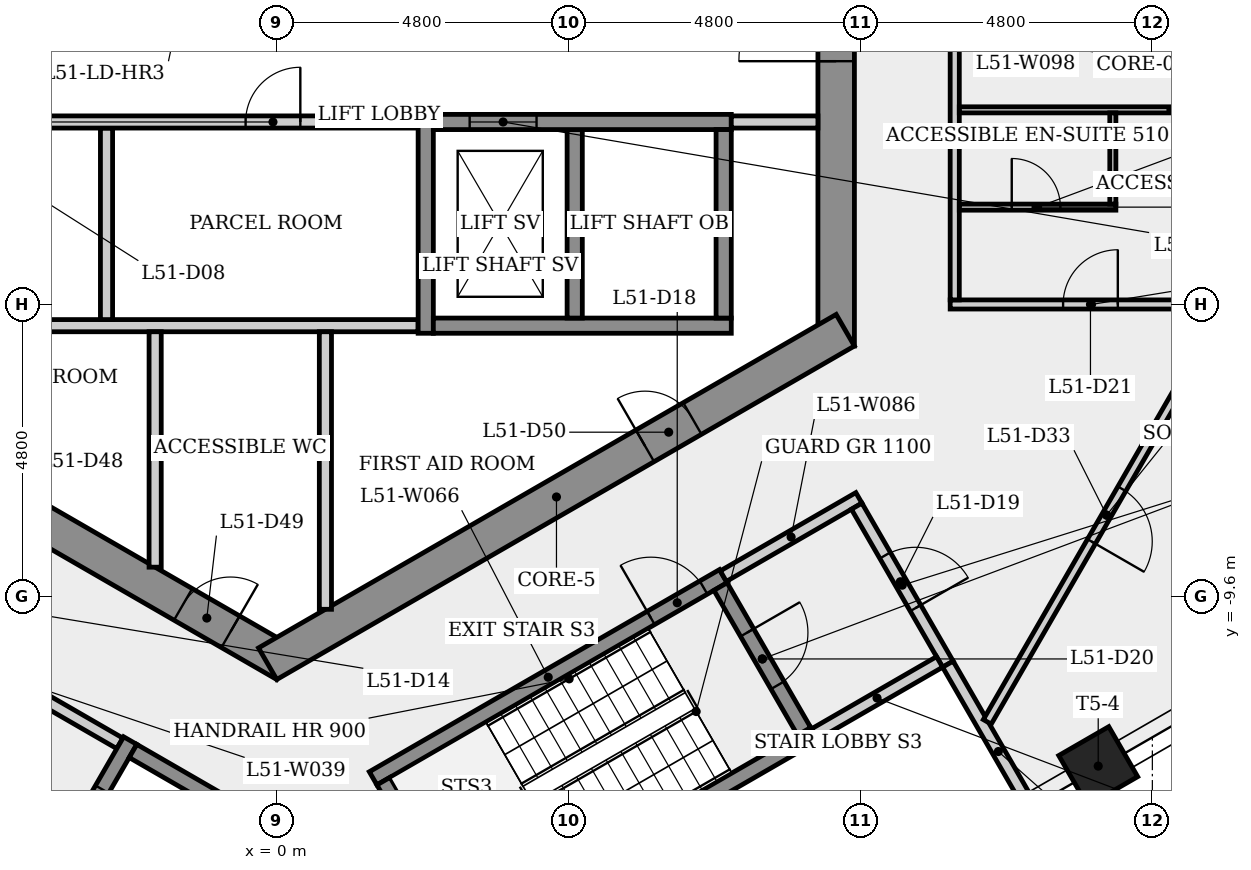
"""IFC4 building model, lengths in metres.
Left out: names, types, materials, properties, quantities, classifications, styles, units other than length and angle.
Written with IfcOpenShell. Run it as: python <this file> out.ifc"""

import sys

from ifc_helpers import new_model, si_unit, direction, frame, frame_2d, origin, origin_2d, place, context, subcontext, project, spatial, rectangle, extrude, element, fill, save


model = new_model("IFC4")
c1 = context("Model", 3, precision=1e-05, world=origin(), true_north=direction((0.0, 1.0)))
c2 = subcontext(c1, "Body", "Model", "MODEL_VIEW")
j1 = project(units=[si_unit("LENGTHUNIT", "METRE"), si_unit("PLANEANGLEUNIT", "RADIAN")], contexts=[c1])
p1 = place(None, origin())
s1 = spatial("IfcSite", under=j1, at=p1, CompositionType="ELEMENT")
p2 = place(p1, origin())
s2 = spatial("IfcBuilding", under=s1, at=p2, CompositionType="ELEMENT")
p3 = place(p2, frame((0.0, 0.0, 190.7)))
s3 = spatial("IfcBuildingStorey", under=s2, at=p3, CompositionType="ELEMENT", Elevation=190.7)
p4 = place(p3, frame((9.2, -5.485, 0.0), z_axis=(0.0, 0.0, 1.0), x_axis=(0.0, 1.0, 0.0)))
e1 = element("IfcWall", 1, at=p4, inside=s3, PredefinedType="SHEAR", context=c2, shape_type="SweptSolid", body=[
    extrude(rectangle(XDim=10.97, YDim=0.6, at=frame_2d((5.485, 0.0))), origin(), (0.0, 0.0, 1.0), 4.0),
])
p5 = place(p4, frame((4.685, 0.0, 0.0)))
e2 = element("IfcOpeningElement", 2, at=p5, cuts=e1, PredefinedType="OPENING", context=c2, shape_type="SweptSolid", body=[
    extrude(rectangle(XDim=1.6, YDim=2.1, at=frame_2d((0.8, 1.05))), frame((0.0, 0.31, 0.0), z_axis=(0.0, -1.0, 0.0), x_axis=(1.0, 0.0, 0.0)), (0.0, 0.0, 1.0), 0.62),
])
p6 = place(p3, frame((-9.35, -5.225, 0.0), z_axis=(0.0, 0.0, 1.0), x_axis=(0.866023993627, -0.500002442456, 0.0)))
e3 = element("IfcWall", 3, at=p6, inside=s3, PredefinedType="SHEAR", context=c2, shape_type="SweptSolid", body=[
    extrude(rectangle(XDim=10.97, YDim=0.6, at=frame_2d((5.485, 0.0))), origin(), (0.0, 0.0, 1.0), 4.0),
])
p7 = place(p6, frame((3.891, 0.0, 0.0)))
e4 = element("IfcOpeningElement", 4, at=p7, cuts=e3, PredefinedType="OPENING", context=c2, shape_type="SweptSolid", body=[
    extrude(rectangle(XDim=0.9, YDim=2.1, at=frame_2d((0.45, 1.05))), frame((0.0, 0.31, 0.0), z_axis=(0.0, -1.0, 0.0), x_axis=(1.0, 0.0, 0.0)), (0.0, 0.0, 1.0), 0.62),
])
p8 = place(p6, frame((9.018, 0.0, 0.0)))
e5 = element("IfcOpeningElement", 5, at=p8, cuts=e3, PredefinedType="OPENING", context=c2, shape_type="SweptSolid", body=[
    extrude(rectangle(XDim=0.9, YDim=2.1, at=frame_2d((0.45, 1.05))), frame((0.0, 0.31, 0.0), z_axis=(0.0, -1.0, 0.0), x_axis=(1.0, 0.0, 0.0)), (0.0, 0.0, 1.0), 0.62),
])
p9 = place(p3, frame((-0.15, -10.71, 0.0), z_axis=(0.0, 0.0, 1.0), x_axis=(0.866023993627, 0.500002442456, 0.0)))
e6 = element("IfcWall", 6, at=p9, inside=s3, PredefinedType="SHEAR", context=c2, shape_type="SweptSolid", body=[
    extrude(rectangle(XDim=10.97, YDim=0.6, at=frame_2d((5.485, 0.0))), origin(), (0.0, 0.0, 1.0), 4.0),
])
p10 = place(p9, frame((7.166, 0.0, 0.0)))
e7 = element("IfcOpeningElement", 7, at=p10, cuts=e6, PredefinedType="OPENING", context=c2, shape_type="SweptSolid", body=[
    extrude(rectangle(XDim=0.9, YDim=2.1, at=frame_2d((0.45, 1.05))), frame((0.0, 0.31, 0.0), z_axis=(0.0, -1.0, 0.0), x_axis=(1.0, 0.0, 0.0)), (0.0, 0.0, 1.0), 0.62),
])
p11 = place(p3, frame((13.51, -12.394, 0.0), z_axis=(0.0, 0.0, 1.0), x_axis=(0.5, -0.866025403784, 0.0)))
e8 = element("IfcColumn", 8, at=p11, inside=s3, PredefinedType="COLUMN", context=c2, shape_type="SweptSolid", body=[
    extrude(rectangle(XDim=0.95, YDim=0.95, at=origin_2d()), origin(), (0.0, 0.0, 1.0), 4.0),
])
p12 = place(p3, frame((-8.88, -5.15, 0.0), z_axis=(0.0, 0.0, 1.0), x_axis=(1.0, 0.0, 0.0)))
e9 = element("IfcWall", 9, at=p12, inside=s3, PredefinedType="PARTITIONING", context=c2, shape_type="SweptSolid", body=[
    extrude(rectangle(XDim=11.205, YDim=0.2, at=frame_2d((5.603, 0.0))), origin(), (0.0, 0.0, 1.0), 3.6),
])
p13 = place(p3, frame((-6.435, -9.795, 0.0), z_axis=(0.0, 0.0, 1.0), x_axis=(0.866012907634, -0.500021643343, 0.0)))
e10 = element("IfcWall", 10, at=p13, inside=s3, PredefinedType="PARTITIONING", context=c2, shape_type="SweptSolid", body=[
    extrude(rectangle(XDim=4.45, YDim=0.2, at=frame_2d((2.225, 0.0))), origin(), (0.0, 0.0, 1.0), 3.6),
])
p14 = place(p13, frame((1.675, 0.0, 0.0)))
e11 = element("IfcOpeningElement", 11, at=p14, cuts=e10, PredefinedType="OPENING", context=c2, shape_type="SweptSolid", body=[
    extrude(rectangle(XDim=1.1, YDim=2.1, at=frame_2d((0.55, 1.05))), frame((0.0, 0.11, 0.0), z_axis=(0.0, -1.0, 0.0), x_axis=(1.0, 0.0, 0.0)), (0.0, 0.0, 1.0), 0.22),
])
p15 = place(p3, frame((-2.8, -1.9, 0.0), z_axis=(0.0, 0.0, 1.0), x_axis=(0.0, -1.0, 0.0)))
e12 = element("IfcWall", 12, at=p15, inside=s3, PredefinedType="PARTITIONING", context=c2, shape_type="SweptSolid", body=[
    extrude(rectangle(XDim=3.15, YDim=0.2, at=frame_2d((1.575, 0.0))), origin(), (0.0, 0.0, 1.0), 3.6),
])
p16 = place(p3, frame((-8.9, -1.8, 0.0), z_axis=(0.0, 0.0, 1.0), x_axis=(1.0, 0.0, 0.0)))
e13 = element("IfcWall", 13, at=p16, inside=s3, PredefinedType="PARTITIONING", context=c2, shape_type="SweptSolid", body=[
    extrude(rectangle(XDim=11.225, YDim=0.2, at=frame_2d((5.613, 0.0))), origin(), (0.0, 0.0, 1.0), 3.6),
])
p17 = place(p16, frame((2.585, 0.0, 0.0)))
e14 = element("IfcOpeningElement", 14, at=p17, cuts=e13, PredefinedType="OPENING", context=c2, shape_type="SweptSolid", body=[
    extrude(rectangle(XDim=0.9, YDim=2.1, at=frame_2d((0.45, 1.05))), frame((0.0, 0.11, 0.0), z_axis=(0.0, -1.0, 0.0), x_axis=(1.0, 0.0, 0.0)), (0.0, 0.0, 1.0), 0.22),
])
p18 = place(p16, frame((8.387, 0.0, 0.0)))
e15 = element("IfcOpeningElement", 15, at=p18, cuts=e13, PredefinedType="OPENING", context=c2, shape_type="SweptSolid", body=[
    extrude(rectangle(XDim=0.9, YDim=2.1, at=frame_2d((0.45, 1.05))), frame((0.0, 0.11, 0.0), z_axis=(0.0, -1.0, 0.0), x_axis=(1.0, 0.0, 0.0)), (0.0, 0.0, 1.0), 0.22),
])
p19 = place(p3, frame((-2.41, -11.974, 0.0), z_axis=(0.0, 0.0, 1.0), x_axis=(-0.500001826776, -0.866024349092, 0.0)))
e16 = element("IfcWall", 16, at=p19, inside=s3, PredefinedType="SHEAR", context=c2, shape_type="SweptSolid", body=[
    extrude(rectangle(XDim=2.95, YDim=0.25, at=frame_2d((1.475, 0.0))), origin(), (0.0, 0.0, 1.0), 3.6),
])
p20 = place(p19, frame((0.925, 0.0, 0.0)))
e17 = element("IfcOpeningElement", 17, at=p20, cuts=e16, PredefinedType="OPENING", context=c2, shape_type="SweptSolid", body=[
    extrude(rectangle(XDim=1.1, YDim=2.1, at=frame_2d((0.55, 1.05))), frame((0.0, 0.135, 0.0), z_axis=(0.0, -1.0, 0.0), x_axis=(1.0, 0.0, 0.0)), (0.0, 0.0, 1.0), 0.27),
])
p21 = place(p3, frame((-2.364, -12.145, 0.0), z_axis=(0.0, 0.0, 1.0), x_axis=(0.866040211805, -0.499974350878, 0.0)))
e18 = element("IfcWall", 18, at=p21, inside=s3, PredefinedType="SHEAR", context=c2, shape_type="SweptSolid", body=[
    extrude(rectangle(XDim=3.3, YDim=0.25, at=frame_2d((1.65, 0.0))), origin(), (0.0, 0.0, 1.0), 3.6),
])
p22 = place(p3, frame((-2.0, -5.25, 0.0), z_axis=(0.0, 0.0, 1.0), x_axis=(0.0, -1.0, 0.0)))
e19 = element("IfcWall", 19, at=p22, inside=s3, PredefinedType="PARTITIONING", context=c2, shape_type="SweptSolid", body=[
    extrude(rectangle(XDim=3.872, YDim=0.2, at=frame_2d((1.936, 0.0))), origin(), (0.0, 0.0, 1.0), 3.6),
])
p23 = place(p3, frame((0.8, -5.25, 0.0), z_axis=(0.0, 0.0, 1.0), x_axis=(0.0, -1.0, 0.0)))
e20 = element("IfcWall", 20, at=p23, inside=s3, PredefinedType="PARTITIONING", context=c2, shape_type="SweptSolid", body=[
    extrude(rectangle(XDim=4.565, YDim=0.2, at=frame_2d((2.282, 0.0))), origin(), (0.0, 0.0, 1.0), 3.6),
])
p24 = place(p3, frame((1.585, -12.595, 0.0), z_axis=(0.0, 0.0, 1.0), x_axis=(0.866036417653, 0.499980922934, 0.0)))
e21 = element("IfcWall", 21, at=p24, inside=s3, PredefinedType="SHEAR", context=c2, shape_type="SweptSolid", body=[
    extrude(rectangle(XDim=6.65, YDim=0.25, at=frame_2d((3.325, 0.0))), origin(), (0.0, 0.0, 1.0), 3.6),
])
p25 = place(p24, frame((5.275, 0.0, 0.0)))
e22 = element("IfcOpeningElement", 22, at=p25, cuts=e21, PredefinedType="OPENING", context=c2, shape_type="SweptSolid", body=[
    extrude(rectangle(XDim=1.0, YDim=2.1, at=frame_2d((0.5, 1.05))), frame((0.0, 0.135, 0.0), z_axis=(0.0, -1.0, 0.0), x_axis=(1.0, 0.0, 0.0)), (0.0, 0.0, 1.0), 0.27),
])
p26 = place(p3, frame((2.45, -5.275, 0.0), z_axis=(0.0, 0.0, 1.0), x_axis=(0.0, 1.0, 0.0)))
e23 = element("IfcWall", 23, at=p26, inside=s3, PredefinedType="SHEAR", context=c2, shape_type="SweptSolid", body=[
    extrude(rectangle(XDim=3.6, YDim=0.25, at=frame_2d((1.8, 0.0))), origin(), (0.0, 0.0, 1.0), 3.6),
])
p27 = place(p3, frame((3.256, -15.239, 0.0), z_axis=(0.0, 0.0, 1.0), x_axis=(-0.50002537861, 0.866010750942, 0.0)))
e24 = element("IfcWall", 24, at=p27, inside=s3, PredefinedType="SHEAR", context=c2, shape_type="SweptSolid", body=[
    extrude(rectangle(XDim=3.0, YDim=0.25, at=frame_2d((1.5, 0.0))), origin(), (0.0, 0.0, 1.0), 3.6),
])
p28 = place(p3, frame((2.575, -5.15, 0.0), z_axis=(0.0, 0.0, 1.0), x_axis=(1.0, 0.0, 0.0)))
e25 = element("IfcWall", 25, at=p28, inside=s3, PredefinedType="SHEAR", context=c2, shape_type="SweptSolid", body=[
    extrude(rectangle(XDim=4.9, YDim=0.25, at=frame_2d((2.45, 0.0))), origin(), (0.0, 0.0, 1.0), 3.6),
])
p29 = place(p3, frame((4.9, -1.925, 0.0), z_axis=(0.0, 0.0, 1.0), x_axis=(0.0, -1.0, 0.0)))
e26 = element("IfcWall", 26, at=p29, inside=s3, PredefinedType="SHEAR", context=c2, shape_type="SweptSolid", body=[
    extrude(rectangle(XDim=3.1, YDim=0.25, at=frame_2d((1.55, 0.0))), origin(), (0.0, 0.0, 1.0), 4.0),
])
p30 = place(p3, frame((2.575, -1.8, 0.0), z_axis=(0.0, 0.0, 1.0), x_axis=(1.0, 0.0, 0.0)))
e27 = element("IfcWall", 27, at=p30, inside=s3, PredefinedType="SHEAR", context=c2, shape_type="SweptSolid", body=[
    extrude(rectangle(XDim=4.9, YDim=0.25, at=frame_2d((2.45, 0.0))), origin(), (0.0, 0.0, 1.0), 3.6),
])
p31 = place(p30, frame((0.597, 0.0, 0.0)))
e28 = element("IfcOpeningElement", 28, at=p31, cuts=e27, PredefinedType="OPENING", context=c2, shape_type="SweptSolid", body=[
    extrude(rectangle(XDim=1.1, YDim=2.1, at=frame_2d((0.55, 1.05))), frame((0.0, 0.135, 0.0), z_axis=(0.0, -1.0, 0.0), x_axis=(1.0, 0.0, 0.0)), (0.0, 0.0, 1.0), 0.27),
])
p32 = place(p3, frame((3.301, -15.068, 0.0), z_axis=(0.0, 0.0, 1.0), x_axis=(0.866035036182, 0.499983315828, 0.0)))
e29 = element("IfcWall", 29, at=p32, inside=s3, PredefinedType="SHEAR", context=c2, shape_type="SweptSolid", body=[
    extrude(rectangle(XDim=6.4, YDim=0.25, at=frame_2d((3.2, 0.0))), origin(), (0.0, 0.0, 1.0), 4.0),
])
p33 = place(p3, frame((7.298, -9.441, 0.0), z_axis=(0.0, 0.0, 1.0), x_axis=(0.500034990121, -0.866005201286, 0.0)))
e30 = element("IfcWall", 30, at=p33, inside=s3, PredefinedType="SHEAR", context=c2, shape_type="SweptSolid", body=[
    extrude(rectangle(XDim=2.75, YDim=0.25, at=frame_2d((1.375, 0.0))), origin(), (0.0, 0.0, 1.0), 3.6),
])
p34 = place(p33, frame((0.875, 0.0, 0.0)))
e31 = element("IfcOpeningElement", 31, at=p34, cuts=e30, PredefinedType="OPENING", context=c2, shape_type="SweptSolid", body=[
    extrude(rectangle(XDim=1.0, YDim=2.1, at=frame_2d((0.5, 1.05))), frame((0.0, 0.135, 0.0), z_axis=(0.0, -1.0, 0.0), x_axis=(1.0, 0.0, 0.0)), (0.0, 0.0, 1.0), 0.27),
])
p35 = place(p3, frame((7.344, -9.27, 0.0), z_axis=(0.0, 0.0, 1.0), x_axis=(0.866005588531, 0.500034319456, 0.0)))
e32 = element("IfcWall", 32, at=p35, inside=s3, PredefinedType="PARTITIONING", context=c2, shape_type="SweptSolid", body=[
    extrude(rectangle(XDim=2.575, YDim=0.2, at=frame_2d((1.288, 0.0))), origin(), (0.0, 0.0, 1.0), 3.6),
])
p36 = place(p3, frame((7.35, -1.925, 0.0), z_axis=(0.0, 0.0, 1.0), x_axis=(0.0, -1.0, 0.0)))
e33 = element("IfcWall", 33, at=p36, inside=s3, PredefinedType="SHEAR", context=c2, shape_type="SweptSolid", body=[
    extrude(rectangle(XDim=3.1, YDim=0.25, at=frame_2d((1.55, 0.0))), origin(), (0.0, 0.0, 1.0), 4.0),
])
p37 = place(p3, frame((8.9, -1.8, 0.0), z_axis=(0.0, 0.0, 1.0), x_axis=(-1.0, 0.0, 0.0)))
e34 = element("IfcWall", 34, at=p37, inside=s3, PredefinedType="PARTITIONING", context=c2, shape_type="SweptSolid", body=[
    extrude(rectangle(XDim=1.425, YDim=0.2, at=frame_2d((0.712, 0.0))), origin(), (0.0, 0.0, 1.0), 3.6),
])
p38 = place(p3, frame((9.537, -8.119, 0.0), z_axis=(0.0, 0.0, 1.0), x_axis=(0.499990139034, -0.866031096941, 0.0)))
e35 = element("IfcWall", 35, at=p38, inside=s3, PredefinedType="PARTITIONING", context=c2, shape_type="SweptSolid", body=[
    extrude(rectangle(XDim=3.0, YDim=0.2, at=frame_2d((1.5, 0.0))), origin(), (0.0, 0.0, 1.0), 3.6),
])
p39 = place(p38, frame((0.935, 0.0, 0.0)))
e36 = element("IfcOpeningElement", 36, at=p39, cuts=e35, PredefinedType="OPENING", context=c2, shape_type="SweptSolid", body=[
    extrude(rectangle(XDim=1.0, YDim=2.1, at=frame_2d((0.5, 1.05))), frame((0.0, 0.11, 0.0), z_axis=(0.0, -1.0, 0.0), x_axis=(1.0, 0.0, 0.0)), (0.0, 0.0, 1.0), 0.22),
])
p40 = place(p3, frame((10.901, -10.681, 0.0), z_axis=(0.0, 0.0, 1.0), x_axis=(-0.866007538022, -0.500030943131, 0.0)))
e37 = element("IfcWall", 37, at=p40, inside=s3, PredefinedType="PLUMBINGWALL", context=c2, shape_type="SweptSolid", body=[
    extrude(rectangle(XDim=2.375, YDim=0.2, at=frame_2d((1.188, 0.0))), origin(), (0.0, 0.0, 1.0), 3.6),
])
p41 = place(p3, frame((11.037, -10.717, 0.0), z_axis=(0.0, 0.0, 1.0), x_axis=(0.500015331954, -0.866016551696, 0.0)))
e38 = element("IfcWall", 38, at=p41, inside=s3, PredefinedType="PLUMBINGWALL", context=c2, shape_type="SweptSolid", body=[
    extrude(rectangle(XDim=3.319, YDim=0.2, at=frame_2d((1.66, 0.0))), origin(), (0.0, 0.0, 1.0), 3.6),
])
p42 = place(p3, frame((11.075, -4.801, 0.0), z_axis=(0.0, 0.0, 1.0), x_axis=(1.0, 0.0, 0.0)))
e39 = element("IfcWall", 39, at=p42, inside=s3, PredefinedType="PARTITIONING", context=c2, shape_type="SweptSolid", body=[
    extrude(rectangle(XDim=4.649, YDim=0.15, at=frame_2d((2.324, 0.0))), origin(), (0.0, 0.0, 1.0), 3.6),
])
p43 = place(p42, frame((1.857, 0.0, 0.0)))
e40 = element("IfcOpeningElement", 40, at=p43, cuts=e39, PredefinedType="OPENING", context=c2, shape_type="SweptSolid", body=[
    extrude(rectangle(XDim=0.9, YDim=2.1, at=frame_2d((0.45, 1.05))), frame((0.0, 0.085, 0.0), z_axis=(0.0, -1.0, 0.0), x_axis=(1.0, 0.0, 0.0)), (0.0, 0.0, 1.0), 0.17),
])
p44 = place(p3, frame((11.15, -4.726, 0.0), z_axis=(0.0, 0.0, 1.0), x_axis=(0.0, 1.0, 0.0)))
e41 = element("IfcWall", 41, at=p44, inside=s3, PredefinedType="PARTITIONING", context=c2, shape_type="SweptSolid", body=[
    extrude(rectangle(XDim=9.603, YDim=0.15, at=frame_2d((4.801, 0.0))), origin(), (0.0, 0.0, 1.0), 3.6),
])
p45 = place(p44, frame((4.226, 0.0, 0.0)))
e42 = element("IfcOpeningElement", 42, at=p45, cuts=e41, PredefinedType="OPENING", context=c2, shape_type="SweptSolid", body=[
    extrude(rectangle(XDim=1.0, YDim=2.1, at=frame_2d((0.5, 1.05))), frame((0.0, 0.085, 0.0), z_axis=(0.0, -1.0, 0.0), x_axis=(1.0, 0.0, 0.0)), (0.0, 0.0, 1.0), 0.17),
])
p46 = place(p3, frame((11.225, -3.2, 0.0), z_axis=(0.0, 0.0, 1.0), x_axis=(1.0, 0.0, 0.0)))
e43 = element("IfcWall", 43, at=p46, inside=s3, PredefinedType="PARTITIONING", context=c2, shape_type="SweptSolid", body=[
    extrude(rectangle(XDim=2.575, YDim=0.1, at=frame_2d((1.288, 0.0))), origin(), (0.0, 0.0, 1.0), 3.6),
])
p47 = place(p46, frame((0.863, 0.0, 0.0)))
e44 = element("IfcOpeningElement", 44, at=p47, cuts=e43, PredefinedType="OPENING", context=c2, shape_type="SweptSolid", body=[
    extrude(rectangle(XDim=0.8, YDim=2.1, at=frame_2d((0.4, 1.05))), frame((0.0, 0.06, 0.0), z_axis=(0.0, -1.0, 0.0), x_axis=(1.0, 0.0, 0.0)), (0.0, 0.0, 1.0), 0.12),
])
p48 = place(p3, frame((11.225, -1.6, 0.0), z_axis=(0.0, 0.0, 1.0), x_axis=(1.0, 0.0, 0.0)))
e45 = element("IfcWall", 45, at=p48, inside=s3, PredefinedType="PARTITIONING", context=c2, shape_type="SweptSolid", body=[
    extrude(rectangle(XDim=6.961, YDim=0.1, at=frame_2d((3.481, 0.0))), origin(), (0.0, 0.0, 1.0), 3.6),
])
p49 = place(p3, frame((13.75, -3.15, 0.0), z_axis=(0.0, 0.0, 1.0), x_axis=(0.0, 1.0, 0.0)))
e46 = element("IfcWall", 46, at=p49, inside=s3, PredefinedType="PARTITIONING", context=c2, shape_type="SweptSolid", body=[
    extrude(rectangle(XDim=1.5, YDim=0.1, at=frame_2d((0.75, 0.0))), origin(), (0.0, 0.0, 1.0), 3.6),
])
p50 = place(p3, frame((15.611, -4.866, 0.0), z_axis=(0.0, 0.0, 1.0), x_axis=(-0.500001468015, -0.866024556224, 0.0)))
e47 = element("IfcWall", 47, at=p50, inside=s3, PredefinedType="PARTITIONING", context=c2, shape_type="SweptSolid", body=[
    extrude(rectangle(XDim=7.852, YDim=0.15, at=frame_2d((3.926, 0.0))), origin(), (0.0, 0.0, 1.0), 3.6),
])
p51 = place(p50, frame((3.426, 0.0, 0.0)))
e48 = element("IfcOpeningElement", 48, at=p51, cuts=e47, PredefinedType="OPENING", context=c2, shape_type="SweptSolid", body=[
    extrude(rectangle(XDim=1.0, YDim=2.1, at=frame_2d((0.5, 1.05))), frame((0.0, 0.085, 0.0), z_axis=(0.0, -1.0, 0.0), x_axis=(1.0, 0.0, 0.0)), (0.0, 0.0, 1.0), 0.17),
])
p52 = place(p31, origin())
e49 = element("IfcDoor", 49, at=p52, inside=s3, OperationType="SLIDING_TO_LEFT", PredefinedType="DOOR", context=c2, shape_type="SweptSolid", body=[
    extrude(rectangle(XDim=1.1, YDim=2.1, at=frame_2d((0.55, 1.05))), frame((0.0, 0.025, 0.0), z_axis=(0.0, -1.0, 0.0), x_axis=(1.0, 0.0, 0.0)), (0.0, 0.0, 1.0), 0.05),
])
fill(e28, e49)
p53 = place(p18, origin())
e50 = element("IfcDoor", 50, at=p53, inside=s3, OperationType="SINGLE_SWING_RIGHT", PredefinedType="DOOR", context=c2, shape_type="SweptSolid", body=[
    extrude(rectangle(XDim=0.9, YDim=2.1, at=frame_2d((0.45, 1.05))), frame((0.0, 0.025, 0.0), z_axis=(0.0, -1.0, 0.0), x_axis=(1.0, 0.0, 0.0)), (0.0, 0.0, 1.0), 0.05),
])
fill(e15, e50)
p54 = place(p20, origin())
e51 = element("IfcDoor", 51, at=p54, inside=s3, OperationType="SLIDING_TO_LEFT", PredefinedType="DOOR", context=c2, shape_type="SweptSolid", body=[
    extrude(rectangle(XDim=1.1, YDim=2.1, at=frame_2d((0.55, 1.05))), frame((0.0, 0.025, 0.0), z_axis=(0.0, -1.0, 0.0), x_axis=(1.0, 0.0, 0.0)), (0.0, 0.0, 1.0), 0.05),
])
fill(e17, e51)
p55 = place(p25, origin())
e52 = element("IfcDoor", 52, at=p55, inside=s3, OperationType="SINGLE_SWING_LEFT", PredefinedType="DOOR", context=c2, shape_type="SweptSolid", body=[
    extrude(rectangle(XDim=1.0, YDim=2.1, at=frame_2d((0.5, 1.05))), frame((0.0, 0.025, 0.0), z_axis=(0.0, -1.0, 0.0), x_axis=(1.0, 0.0, 0.0)), (0.0, 0.0, 1.0), 0.05),
])
fill(e22, e52)
p56 = place(p39, origin())
e53 = element("IfcDoor", 53, at=p56, inside=s3, OperationType="SINGLE_SWING_RIGHT", PredefinedType="DOOR", context=c2, shape_type="SweptSolid", body=[
    extrude(rectangle(XDim=1.0, YDim=2.1, at=frame_2d((0.5, 1.05))), frame((0.0, 0.025, 0.0), z_axis=(0.0, -1.0, 0.0), x_axis=(1.0, 0.0, 0.0)), (0.0, 0.0, 1.0), 0.05),
])
fill(e36, e53)
p57 = place(p34, origin())
e54 = element("IfcDoor", 54, at=p57, inside=s3, OperationType="SINGLE_SWING_LEFT", PredefinedType="DOOR", context=c2, shape_type="SweptSolid", body=[
    extrude(rectangle(XDim=1.0, YDim=2.1, at=frame_2d((0.5, 1.05))), frame((0.0, 0.025, 0.0), z_axis=(0.0, -1.0, 0.0), x_axis=(1.0, 0.0, 0.0)), (0.0, 0.0, 1.0), 0.05),
])
fill(e31, e54)
p58 = place(p43, origin())
e55 = element("IfcDoor", 55, at=p58, inside=s3, OperationType="SINGLE_SWING_RIGHT", PredefinedType="DOOR", context=c2, shape_type="SweptSolid", body=[
    extrude(rectangle(XDim=0.9, YDim=2.1, at=frame_2d((0.45, 1.05))), frame((0.0, 0.025, 0.0), z_axis=(0.0, -1.0, 0.0), x_axis=(1.0, 0.0, 0.0)), (0.0, 0.0, 1.0), 0.05),
])
fill(e40, e55)
p59 = place(p47, origin())
e56 = element("IfcDoor", 56, at=p59, inside=s3, OperationType="SINGLE_SWING_LEFT", PredefinedType="DOOR", context=c2, shape_type="SweptSolid", body=[
    extrude(rectangle(XDim=0.8, YDim=2.1, at=frame_2d((0.4, 1.05))), frame((0.0, 0.025, 0.0), z_axis=(0.0, -1.0, 0.0), x_axis=(1.0, 0.0, 0.0)), (0.0, 0.0, 1.0), 0.05),
])
fill(e44, e56)
p60 = place(p51, origin())
e57 = element("IfcDoor", 57, at=p60, inside=s3, OperationType="SINGLE_SWING_RIGHT", PredefinedType="DOOR", context=c2, shape_type="SweptSolid", body=[
    extrude(rectangle(XDim=1.0, YDim=2.1, at=frame_2d((0.5, 1.05))), frame((0.0, 0.025, 0.0), z_axis=(0.0, -1.0, 0.0), x_axis=(1.0, 0.0, 0.0)), (0.0, 0.0, 1.0), 0.05),
])
fill(e48, e57)
p61 = place(p8, origin())
e58 = element("IfcDoor", 58, at=p61, inside=s3, OperationType="SINGLE_SWING_RIGHT", PredefinedType="DOOR", context=c2, shape_type="SweptSolid", body=[
    extrude(rectangle(XDim=0.9, YDim=2.1, at=frame_2d((0.45, 1.05))), frame((0.0, 0.025, 0.0), z_axis=(0.0, -1.0, 0.0), x_axis=(1.0, 0.0, 0.0)), (0.0, 0.0, 1.0), 0.05),
])
fill(e5, e58)
p62 = place(p10, origin())
e59 = element("IfcDoor", 59, at=p62, inside=s3, OperationType="SINGLE_SWING_LEFT", PredefinedType="DOOR", context=c2, shape_type="SweptSolid", body=[
    extrude(rectangle(XDim=0.9, YDim=2.1, at=frame_2d((0.45, 1.05))), frame((0.0, 0.025, 0.0), z_axis=(0.0, -1.0, 0.0), x_axis=(1.0, 0.0, 0.0)), (0.0, 0.0, 1.0), 0.05),
])
fill(e7, e59)
p63 = place(p5, origin())
e60 = element("IfcDoor", 60, at=p63, inside=s3, OperationType="SINGLE_SWING_LEFT", PredefinedType="DOOR", context=c2, shape_type="SweptSolid", body=[
    extrude(rectangle(XDim=1.6, YDim=2.1, at=frame_2d((0.8, 1.05))), frame((0.0, 0.025, 0.0), z_axis=(0.0, -1.0, 0.0), x_axis=(1.0, 0.0, 0.0)), (0.0, 0.0, 1.0), 0.05),
])
fill(e2, e60)
save(model, sys.argv[1])
